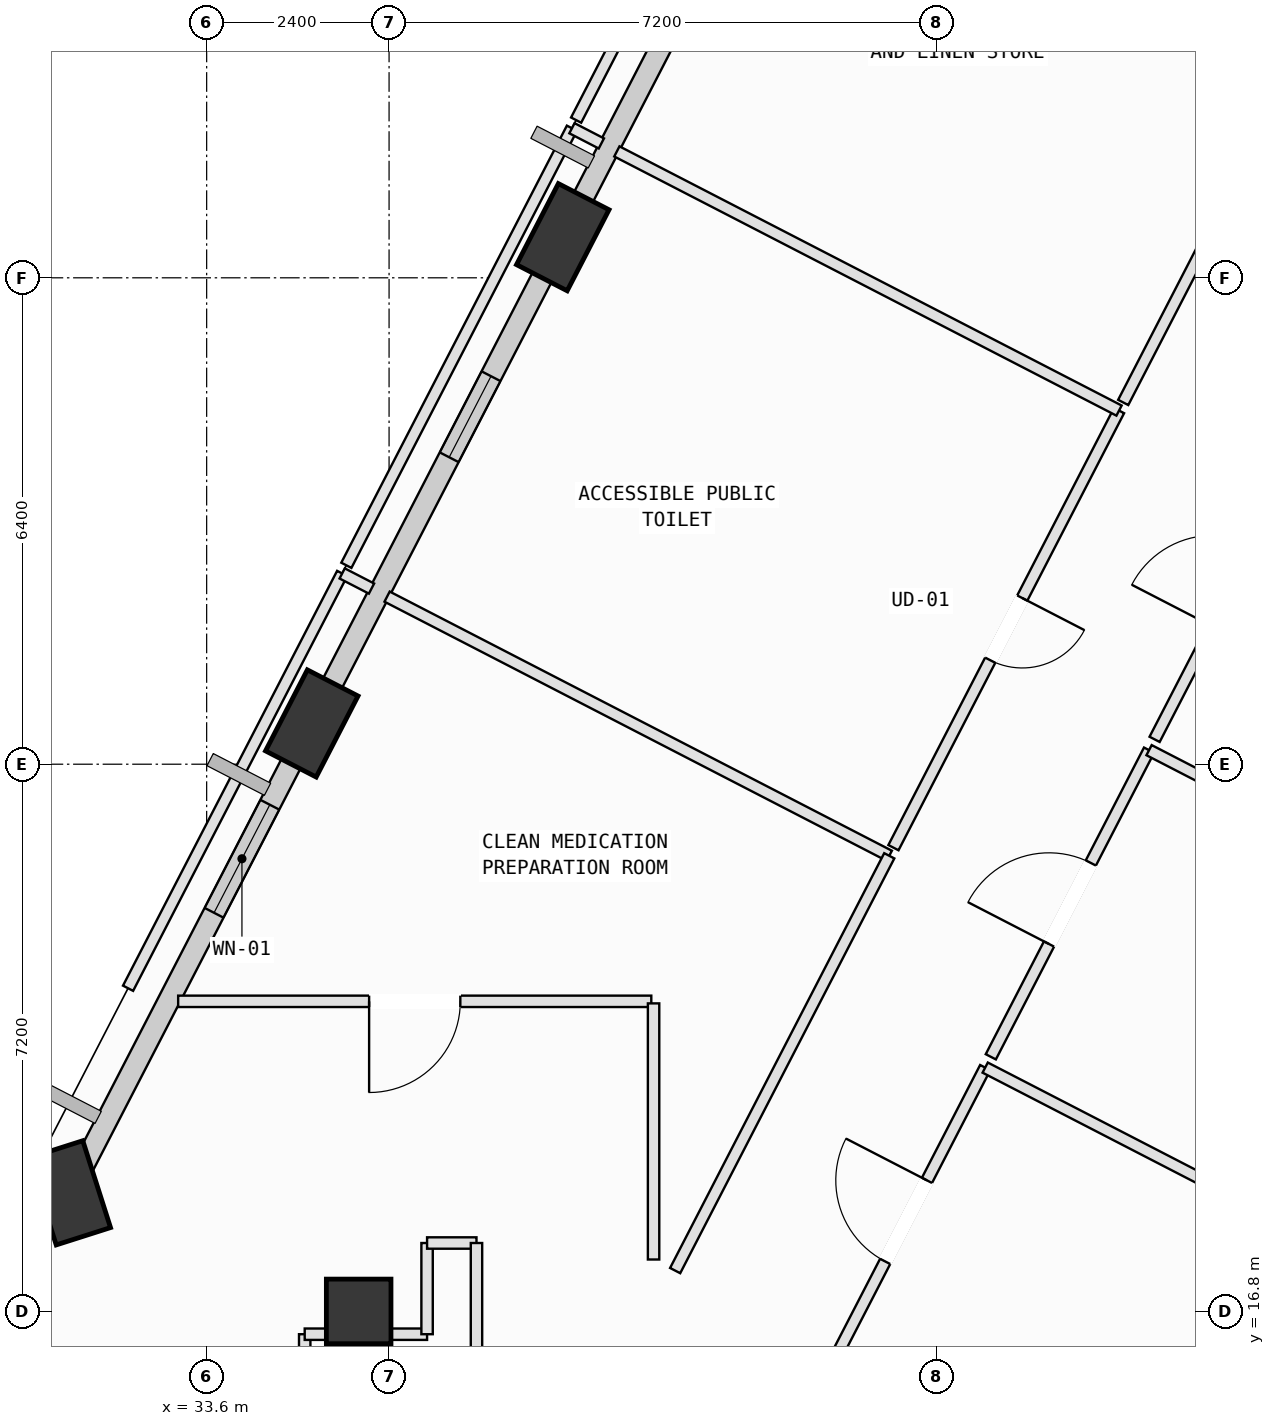
"""IFC4 building model, lengths in metres.
Left out: names, types, materials, properties, quantities, classifications, styles, units other than length and angle.
Written with IfcOpenShell. Run it as: python <this file> out.ifc"""

import sys

from ifc_helpers import new_model, si_unit, direction, frame, frame_2d, origin, origin_2d, place, context, subcontext, project, spatial, rectangle, extrude, element, fill, save


model = new_model("IFC4")
c1 = context("Model", 3, precision=1e-05, world=origin(), true_north=direction((0.0, 1.0)))
c2 = subcontext(c1, "Body", "Model", "MODEL_VIEW")
j1 = project(units=[si_unit("LENGTHUNIT", "METRE"), si_unit("PLANEANGLEUNIT", "RADIAN")], contexts=[c1])
p1 = place(None, origin())
s1 = spatial("IfcSite", under=j1, at=p1, CompositionType="ELEMENT")
p2 = place(p1, origin())
s2 = spatial("IfcBuilding", under=s1, at=p2, CompositionType="ELEMENT")
p3 = place(p2, frame((0.0, 0.0, 292.6)))
s3 = spatial("IfcBuildingStorey", under=s2, at=p3, CompositionType="ELEMENT", Elevation=292.6)
p4 = place(p3, frame((35.6, 16.8, 0.0), z_axis=(0.0, 0.0, 1.0), x_axis=(1.0, 0.0, 0.0)))
e1 = element("IfcColumn", 1, at=p4, inside=s3, PredefinedType="COLUMN", context=c2, shape_type="SweptSolid", body=[
    extrude(rectangle(XDim=0.85, YDim=0.85, at=origin_2d()), origin(), (0.0, 0.0, 1.0), 4.0),
])
p5 = place(p3, frame((38.285, 30.934, 0.002), z_axis=(-0.025584050071, 0.019233832393, 0.999487626774), x_axis=(0.434309594516, -0.900314501729, 0.028442469799)))
e2 = element("IfcColumn", 2, at=p5, inside=s3, PredefinedType="COLUMN", context=c2, shape_type="SweptSolid", body=[
    extrude(rectangle(XDim=1.2, YDim=0.75, at=origin_2d()), origin(), (0.0, 0.0, 1.0), 3.998),
])
p6 = place(p3, frame((34.983, 24.536, 0.002), z_axis=(0.001038530792, 0.005742464379, 0.999982972633), x_axis=(-0.609467423178, -0.792794153179, 0.005185631168)))
e3 = element("IfcColumn", 3, at=p6, inside=s3, PredefinedType="COLUMN", context=c2, shape_type="SweptSolid", body=[
    extrude(rectangle(XDim=1.2, YDim=0.75, at=origin_2d()), origin(), (0.0, 0.0, 1.0), 3.996),
])
p7 = place(p3, frame((31.795, 18.36, 0.002), z_axis=(0.026747615739, -0.007267046285, 0.999615803742), x_axis=(-0.998694834125, -0.043719525929, 0.026405138601)))
e4 = element("IfcColumn", 4, at=p7, inside=s3, PredefinedType="COLUMN", context=c2, shape_type="SweptSolid", body=[
    extrude(rectangle(XDim=1.2, YDim=0.75, at=origin_2d()), origin(), (0.0, 0.0, 1.0), 3.998),
])
p8 = place(p3, frame((38.47, 31.292, 0.0), z_axis=(0.0, 0.0, 1.0), x_axis=(0.458656678591, 0.888613555593, 0.0)))
e5 = element("IfcWall", 5, at=p8, inside=s3, PredefinedType="SOLIDWALL", context=c2, shape_type="SweptSolid", body=[
    extrude(rectangle(XDim=6.78, YDim=0.28, at=frame_2d((3.39, 0.0))), origin(), (0.0, 0.0, 1.0), 3.265),
])
p9 = place(p8, frame((3.113, 0.0, 0.75)))
e6 = element("IfcOpeningElement", 6, at=p9, cuts=e5, PredefinedType="OPENING", context=c2, shape_type="SweptSolid", body=[
    extrude(rectangle(XDim=1.8, YDim=2.05, at=frame_2d((0.9, 1.025))), frame((0.0, 0.15, 0.0), z_axis=(0.0, -1.0, 0.0), x_axis=(1.0, 0.0, 0.0)), (0.0, 0.0, 1.0), 0.3),
])
p10 = place(p3, frame((35.17, 24.899, 0.0), z_axis=(0.0, 0.0, 1.0), x_axis=(0.458649711601, 0.888617151561, 0.0)))
e7 = element("IfcWall", 7, at=p10, inside=s3, PredefinedType="SOLIDWALL", context=c2, shape_type="SweptSolid", body=[
    extrude(rectangle(XDim=6.409, YDim=0.28, at=frame_2d((3.205, 0.0))), origin(), (0.0, 0.0, 1.0), 3.265),
])
p11 = place(p10, frame((3.533, 0.0, 0.75)))
e8 = element("IfcOpeningElement", 8, at=p11, cuts=e7, PredefinedType="OPENING", context=c2, shape_type="SweptSolid", body=[
    extrude(rectangle(XDim=1.2, YDim=1.75, at=frame_2d((0.6, 0.875))), frame((0.0, 0.15, 0.0), z_axis=(0.0, -1.0, 0.0), x_axis=(1.0, 0.0, 0.0)), (0.0, 0.0, 1.0), 0.3),
])
p12 = place(p3, frame((31.981, 18.721, 0.0), z_axis=(0.0, 0.0, 1.0), x_axis=(0.458658067714, 0.888612838598, 0.0)))
e9 = element("IfcWall", 9, at=p12, inside=s3, PredefinedType="SOLIDWALL", context=c2, shape_type="SweptSolid", body=[
    extrude(rectangle(XDim=6.158, YDim=0.28, at=frame_2d((3.079, 0.0))), origin(), (0.0, 0.0, 1.0), 3.265),
])
p13 = place(p12, frame((3.741, 0.0, 0.75)))
e10 = element("IfcOpeningElement", 10, at=p13, cuts=e9, PredefinedType="OPENING", context=c2, shape_type="SweptSolid", body=[
    extrude(rectangle(XDim=1.6, YDim=1.95, at=frame_2d((0.8, 0.975))), frame((0.0, 0.15, 0.0), z_axis=(0.0, -1.0, 0.0), x_axis=(1.0, 0.0, 0.0)), (0.0, 0.0, 1.0), 0.3),
])
p14 = place(p3, frame((35.6, 7.8, 0.0), z_axis=(0.0, 0.0, 1.0), x_axis=(0.0, 1.0, 0.0)))
e11 = element("IfcWall", 11, at=p14, inside=s3, PredefinedType="SHEAR", context=c2, shape_type="SweptSolid", body=[
    extrude(rectangle(XDim=9.0, YDim=0.45, at=frame_2d((4.5, 0.0))), origin(), (0.0, 0.0, 1.0), 3.78),
])
p15 = place(p3, frame((41.761, 15.974, 0.0), z_axis=(0.0, 0.0, 1.0), x_axis=(0.45864291977, 0.888620657055, 0.0)))
e12 = element("IfcWall", 12, at=p15, inside=s3, PredefinedType="PARTITIONING", context=c2, shape_type="SweptSolid", body=[
    extrude(rectangle(XDim=4.54, YDim=0.15, at=frame_2d((2.27, 0.0))), origin(), (0.0, 0.0, 1.0), 3.78),
])
p16 = place(p15, frame((1.67, 0.0, 0.0)))
e13 = element("IfcOpeningElement", 13, at=p16, cuts=e12, PredefinedType="OPENING", context=c2, shape_type="SweptSolid", body=[
    extrude(rectangle(XDim=1.2, YDim=2.15, at=frame_2d((0.6, 1.075))), frame((0.0, 0.085, 0.0), z_axis=(0.0, -1.0, 0.0), x_axis=(1.0, 0.0, 0.0)), (0.0, 0.0, 1.0), 0.17),
])
p17 = place(p3, frame((43.843, 20.008, 0.0), z_axis=(0.0, 0.0, 1.0), x_axis=(0.888649389218, -0.458587246926, 0.0)))
e14 = element("IfcWall", 14, at=p17, inside=s3, PredefinedType="PARTITIONING", context=c2, shape_type="SweptSolid", body=[
    extrude(rectangle(XDim=10.835, YDim=0.15, at=frame_2d((5.418, 0.0))), origin(), (0.0, 0.0, 1.0), 3.78),
])
p18 = place(p3, frame((43.917, 20.15, 0.0), z_axis=(0.0, 0.0, 1.0), x_axis=(0.458533348006, 0.888677201669, 0.0)))
e15 = element("IfcWall", 15, at=p18, inside=s3, PredefinedType="PARTITIONING", context=c2, shape_type="SweptSolid", body=[
    extrude(rectangle(XDim=4.541, YDim=0.15, at=frame_2d((2.27, 0.0))), origin(), (0.0, 0.0, 1.0), 3.78),
])
p19 = place(p18, frame((1.67, 0.0, 0.0)))
e16 = element("IfcOpeningElement", 16, at=p19, cuts=e15, PredefinedType="OPENING", context=c2, shape_type="SweptSolid", body=[
    extrude(rectangle(XDim=1.2, YDim=2.15, at=frame_2d((0.6, 1.075))), frame((0.0, 0.085, 0.0), z_axis=(0.0, -1.0, 0.0), x_axis=(1.0, 0.0, 0.0)), (0.0, 0.0, 1.0), 0.17),
])
p20 = place(p3, frame((45.999, 24.185, 0.0), z_axis=(0.0, 0.0, 1.0), x_axis=(0.888593697923, -0.458695149321, 0.0)))
e17 = element("IfcWall", 17, at=p20, inside=s3, PredefinedType="PARTITIONING", context=c2, shape_type="SweptSolid", body=[
    extrude(rectangle(XDim=10.835, YDim=0.15, at=frame_2d((5.417, 0.0))), origin(), (0.0, 0.0, 1.0), 3.78),
])
p21 = place(p3, frame((46.072, 24.327, 0.0), z_axis=(0.0, 0.0, 1.0), x_axis=(0.458621001786, 0.888631969221, 0.0)))
e18 = element("IfcWall", 18, at=p21, inside=s3, PredefinedType="PARTITIONING", context=c2, shape_type="SweptSolid", body=[
    extrude(rectangle(XDim=4.54, YDim=0.15, at=frame_2d((2.27, 0.0))), origin(), (0.0, 0.0, 1.0), 3.78),
])
p22 = place(p21, frame((1.67, 0.0, 0.0)))
e19 = element("IfcOpeningElement", 19, at=p22, cuts=e18, PredefinedType="OPENING", context=c2, shape_type="SweptSolid", body=[
    extrude(rectangle(XDim=1.2, YDim=2.15, at=frame_2d((0.6, 1.075))), frame((0.0, 0.085, 0.0), z_axis=(0.0, -1.0, 0.0), x_axis=(1.0, 0.0, 0.0)), (0.0, 0.0, 1.0), 0.17),
])
p23 = place(p3, frame((34.89, 15.42, 0.0), z_axis=(0.0, 0.0, 1.0), x_axis=(0.0, 1.0, 0.0)))
e20 = element("IfcWall", 20, at=p23, inside=s3, PredefinedType="PARTITIONING", context=c2, shape_type="SweptSolid", body=[
    extrude(rectangle(XDim=1.08, YDim=0.15, at=frame_2d((0.54, 0.0))), origin(), (0.0, 0.0, 1.0), 3.78),
])
p24 = place(p3, frame((34.89, 16.5, 0.0), z_axis=(0.0, 0.0, 1.0), x_axis=(1.0, 0.0, 0.0)))
e21 = element("IfcWall", 21, at=p24, inside=s3, PredefinedType="PARTITIONING", context=c2, shape_type="SweptSolid", body=[
    extrude(rectangle(XDim=1.61, YDim=0.15, at=frame_2d((0.805, 0.0))), origin(), (0.0, 0.0, 1.0), 3.165),
])
p25 = place(p3, frame((36.5, 16.5, 0.0), z_axis=(0.0, 0.0, 1.0), x_axis=(0.0, 1.0, 0.0)))
e22 = element("IfcWall", 22, at=p25, inside=s3, PredefinedType="PARTITIONING", context=c2, shape_type="SweptSolid", body=[
    extrude(rectangle(XDim=1.2, YDim=0.15, at=frame_2d((0.6, 0.0))), origin(), (0.0, 0.0, 1.0), 3.78),
])
p26 = place(p3, frame((36.5, 17.7, 0.0), z_axis=(0.0, 0.0, 1.0), x_axis=(1.0, 0.0, 0.0)))
e23 = element("IfcWall", 23, at=p26, inside=s3, PredefinedType="PARTITIONING", context=c2, shape_type="SweptSolid", body=[
    extrude(rectangle(XDim=0.65, YDim=0.15, at=frame_2d((0.325, 0.0))), origin(), (0.0, 0.0, 1.0), 3.78),
])
p27 = place(p3, frame((37.15, 17.7, 0.0), z_axis=(0.0, 0.0, 1.0), x_axis=(0.0, -1.0, 0.0)))
e24 = element("IfcWall", 24, at=p27, inside=s3, PredefinedType="PARTITIONING", context=c2, shape_type="SweptSolid", body=[
    extrude(rectangle(XDim=5.427, YDim=0.15, at=frame_2d((2.713, 0.0))), origin(), (0.0, 0.0, 1.0), 3.78),
])
p28 = place(p27, frame((1.401, 0.0, 0.0)))
e25 = element("IfcOpeningElement", 25, at=p28, cuts=e24, PredefinedType="OPENING", context=c2, shape_type="SweptSolid", body=[
    extrude(rectangle(XDim=1.0, YDim=2.12, at=frame_2d((0.5, 1.06))), frame((0.0, 0.085, 0.0), z_axis=(0.0, -1.0, 0.0), x_axis=(1.0, 0.0, 0.0)), (0.0, 0.0, 1.0), 0.17),
])
p29 = place(p3, frame((39.45, 20.88, 0.0), z_axis=(0.0, 0.0, 1.0), x_axis=(-1.0, 0.0, 0.0)))
e26 = element("IfcWall", 26, at=p29, inside=s3, PredefinedType="PARTITIONING", context=c2, shape_type="SweptSolid", body=[
    extrude(rectangle(XDim=6.225, YDim=0.15, at=frame_2d((3.112, 0.0))), origin(), (0.0, 0.0, 1.0), 3.415),
])
p30 = place(p29, frame((2.512, 0.0, 0.0)))
e27 = element("IfcOpeningElement", 27, at=p30, cuts=e26, PredefinedType="OPENING", context=c2, shape_type="SweptSolid", body=[
    extrude(rectangle(XDim=1.2, YDim=2.15, at=frame_2d((0.6, 1.075))), frame((0.0, 0.085, 0.0), z_axis=(0.0, -1.0, 0.0), x_axis=(1.0, 0.0, 0.0)), (0.0, 0.0, 1.0), 0.17),
])
p31 = place(p3, frame((32.566, 21.052, 0.0), z_axis=(0.0, 0.0, 1.0), x_axis=(0.45865608207, 0.888613863486, 0.0)))
e28 = element("IfcWall", 28, at=p31, inside=s3, PredefinedType="PARTITIONING", context=c2, shape_type="SweptSolid", body=[
    extrude(rectangle(XDim=6.142, YDim=0.15, at=frame_2d((3.071, 0.0))), origin(), (0.0, 0.0, 1.0), 3.78),
])
p32 = place(p3, frame((35.383, 26.51, 0.0), z_axis=(0.0, 0.0, 1.0), x_axis=(0.888849679111, -0.458198917442, 0.0)))
e29 = element("IfcWall", 29, at=p32, inside=s3, PredefinedType="PARTITIONING", context=c2, shape_type="SweptSolid", body=[
    extrude(rectangle(XDim=0.434, YDim=0.15, at=frame_2d((0.217, 0.0))), origin(), (0.0, 0.0, 1.0), 3.78),
])
p33 = place(p3, frame((35.974, 26.205, 0.0), z_axis=(0.0, 0.0, 1.0), x_axis=(0.888613749746, -0.458656302433, 0.0)))
e30 = element("IfcWall", 30, at=p33, inside=s3, PredefinedType="PARTITIONING", context=c2, shape_type="SweptSolid", body=[
    extrude(rectangle(XDim=7.435, YDim=0.15, at=frame_2d((3.718, 0.0))), origin(), (0.0, 0.0, 1.0), 3.78),
])
p34 = place(p3, frame((42.581, 22.795, 0.0), z_axis=(0.0, 0.0, 1.0), x_axis=(-0.45865608207, -0.888613863486, 0.0)))
e31 = element("IfcWall", 31, at=p34, inside=s3, PredefinedType="PARTITIONING", context=c2, shape_type="SweptSolid", body=[
    extrude(rectangle(XDim=6.142, YDim=0.15, at=frame_2d((3.071, 0.0))), origin(), (0.0, 0.0, 1.0), 3.78),
])
p35 = place(p3, frame((39.48, 17.483, 0.0), z_axis=(0.0, 0.0, 1.0), x_axis=(0.0, 1.0, 0.0)))
e32 = element("IfcWall", 32, at=p35, inside=s3, PredefinedType="PARTITIONING", context=c2, shape_type="SweptSolid", body=[
    extrude(rectangle(XDim=3.37, YDim=0.15, at=frame_2d((1.685, 0.0))), origin(), (0.0, 0.0, 1.0), 3.78),
])
p36 = place(p3, frame((45.604, 28.653, 0.0), z_axis=(0.0, 0.0, 1.0), x_axis=(-0.458615052494, -0.888635039612, 0.0)))
e33 = element("IfcWall", 33, at=p36, inside=s3, PredefinedType="PARTITIONING", context=c2, shape_type="SweptSolid", body=[
    extrude(rectangle(XDim=6.472, YDim=0.15, at=frame_2d((3.236, 0.0))), origin(), (0.0, 0.0, 1.0), 3.78),
])
p37 = place(p36, frame((2.776, 0.0, 0.0)))
e34 = element("IfcOpeningElement", 34, at=p37, cuts=e33, PredefinedType="OPENING", context=c2, shape_type="SweptSolid", body=[
    extrude(rectangle(XDim=0.92, YDim=2.1, at=frame_2d((0.46, 1.05))), frame((0.0, 0.085, 0.0), z_axis=(0.0, -1.0, 0.0), x_axis=(1.0, 0.0, 0.0)), (0.0, 0.0, 1.0), 0.17),
])
p38 = place(p3, frame((35.438, 26.617, 0.0), z_axis=(0.0, 0.0, 1.0), x_axis=(0.458615052494, 0.888635039612, 0.0)))
e35 = element("IfcWall", 35, at=p38, inside=s3, PredefinedType="PARTITIONING", context=c2, shape_type="SweptSolid", body=[
    extrude(rectangle(XDim=6.472, YDim=0.15, at=frame_2d((3.236, 0.0))), origin(), (0.0, 0.0, 1.0), 3.265),
])
p39 = place(p3, frame((38.406, 32.368, 0.0), z_axis=(0.0, 0.0, 1.0), x_axis=(0.888406857878, -0.459056918992, 0.0)))
e36 = element("IfcWall", 36, at=p39, inside=s3, PredefinedType="PARTITIONING", context=c2, shape_type="SweptSolid", body=[
    extrude(rectangle(XDim=0.436, YDim=0.15, at=frame_2d((0.218, 0.0))), origin(), (0.0, 0.0, 1.0), 3.78),
])
p40 = place(p3, frame((38.997, 32.063, 0.0), z_axis=(0.0, 0.0, 1.0), x_axis=(0.888627132571, -0.45863037324, 0.0)))
e37 = element("IfcWall", 37, at=p40, inside=s3, PredefinedType="PARTITIONING", context=c2, shape_type="SweptSolid", body=[
    extrude(rectangle(XDim=7.435, YDim=0.15, at=frame_2d((3.718, 0.0))), origin(), (0.0, 0.0, 1.0), 3.78),
])
p41 = place(p3, frame((48.939, 35.115, 0.0), z_axis=(0.0, 0.0, 1.0), x_axis=(-0.458647267692, -0.888618412953, 0.0)))
e38 = element("IfcWall", 38, at=p41, inside=s3, PredefinedType="PARTITIONING", context=c2, shape_type="SweptSolid", body=[
    extrude(rectangle(XDim=7.152, YDim=0.15, at=frame_2d((3.576, 0.0))), origin(), (0.0, 0.0, 1.0), 3.78),
])
p42 = place(p41, frame((3.116, 0.0, 0.0)))
e39 = element("IfcOpeningElement", 39, at=p42, cuts=e38, PredefinedType="OPENING", context=c2, shape_type="SweptSolid", body=[
    extrude(rectangle(XDim=0.92, YDim=2.1, at=frame_2d((0.46, 1.05))), frame((0.0, 0.085, 0.0), z_axis=(0.0, -1.0, 0.0), x_axis=(1.0, 0.0, 0.0)), (0.0, 0.0, 1.0), 0.17),
])
p43 = place(p3, frame((38.461, 32.475, 0.0), z_axis=(0.0, 0.0, 1.0), x_axis=(0.458791602038, 0.888543902066, 0.0)))
e40 = element("IfcWall", 40, at=p43, inside=s3, PredefinedType="PARTITIONING", context=c2, shape_type="SweptSolid", body=[
    extrude(rectangle(XDim=6.65, YDim=0.15, at=frame_2d((3.325, 0.0))), origin(), (0.0, 0.0, 1.0), 3.265),
])
p44 = place(p11, origin())
e41 = element("IfcWindow", 41, at=p44, inside=s3, PartitioningType="SINGLE_PANEL", PredefinedType="WINDOW", context=c2, shape_type="SweptSolid", body=[
    extrude(rectangle(XDim=1.2, YDim=1.75, at=frame_2d((0.6, 0.875))), frame((0.0, 0.03, 0.0), z_axis=(0.0, -1.0, 0.0), x_axis=(1.0, 0.0, 0.0)), (0.0, 0.0, 1.0), 0.06),
])
fill(e8, e41)
p45 = place(p13, origin())
e42 = element("IfcWindow", 42, at=p45, inside=s3, PartitioningType="SINGLE_PANEL", PredefinedType="WINDOW", context=c2, shape_type="SweptSolid", body=[
    extrude(rectangle(XDim=1.6, YDim=1.95, at=frame_2d((0.8, 0.975))), frame((0.0, 0.03, 0.0), z_axis=(0.0, -1.0, 0.0), x_axis=(1.0, 0.0, 0.0)), (0.0, 0.0, 1.0), 0.06),
])
fill(e10, e42)
p46 = place(p16, origin())
e43 = element("IfcDoor", 43, at=p46, inside=s3, OperationType="SINGLE_SWING_RIGHT", PredefinedType="DOOR", context=c2, shape_type="SweptSolid", body=[
    extrude(rectangle(XDim=1.2, YDim=2.15, at=frame_2d((0.6, 1.075))), frame((0.0, 0.025, 0.0), z_axis=(0.0, -1.0, 0.0), x_axis=(1.0, 0.0, 0.0)), (0.0, 0.0, 1.0), 0.05),
])
fill(e13, e43)
p47 = place(p19, origin())
e44 = element("IfcDoor", 44, at=p47, inside=s3, OperationType="SINGLE_SWING_LEFT", PredefinedType="DOOR", context=c2, shape_type="SweptSolid", body=[
    extrude(rectangle(XDim=1.2, YDim=2.15, at=frame_2d((0.6, 1.075))), frame((0.0, 0.025, 0.0), z_axis=(0.0, -1.0, 0.0), x_axis=(1.0, 0.0, 0.0)), (0.0, 0.0, 1.0), 0.05),
])
fill(e16, e44)
p48 = place(p30, origin())
e45 = element("IfcDoor", 45, at=p48, inside=s3, OperationType="SINGLE_SWING_RIGHT", PredefinedType="DOOR", context=c2, shape_type="SweptSolid", body=[
    extrude(rectangle(XDim=1.2, YDim=2.15, at=frame_2d((0.6, 1.075))), frame((0.0, 0.025, 0.0), z_axis=(0.0, -1.0, 0.0), x_axis=(1.0, 0.0, 0.0)), (0.0, 0.0, 1.0), 0.05),
])
fill(e27, e45)
p49 = place(p37, origin())
e46 = element("IfcDoor", 46, at=p49, inside=s3, OperationType="SINGLE_SWING_LEFT", PredefinedType="DOOR", context=c2, shape_type="SweptSolid", body=[
    extrude(rectangle(XDim=0.92, YDim=2.1, at=frame_2d((0.46, 1.05))), frame((0.0, 0.025, 0.0), z_axis=(0.0, -1.0, 0.0), x_axis=(1.0, 0.0, 0.0)), (0.0, 0.0, 1.0), 0.05),
])
fill(e34, e46)
save(model, sys.argv[1])
